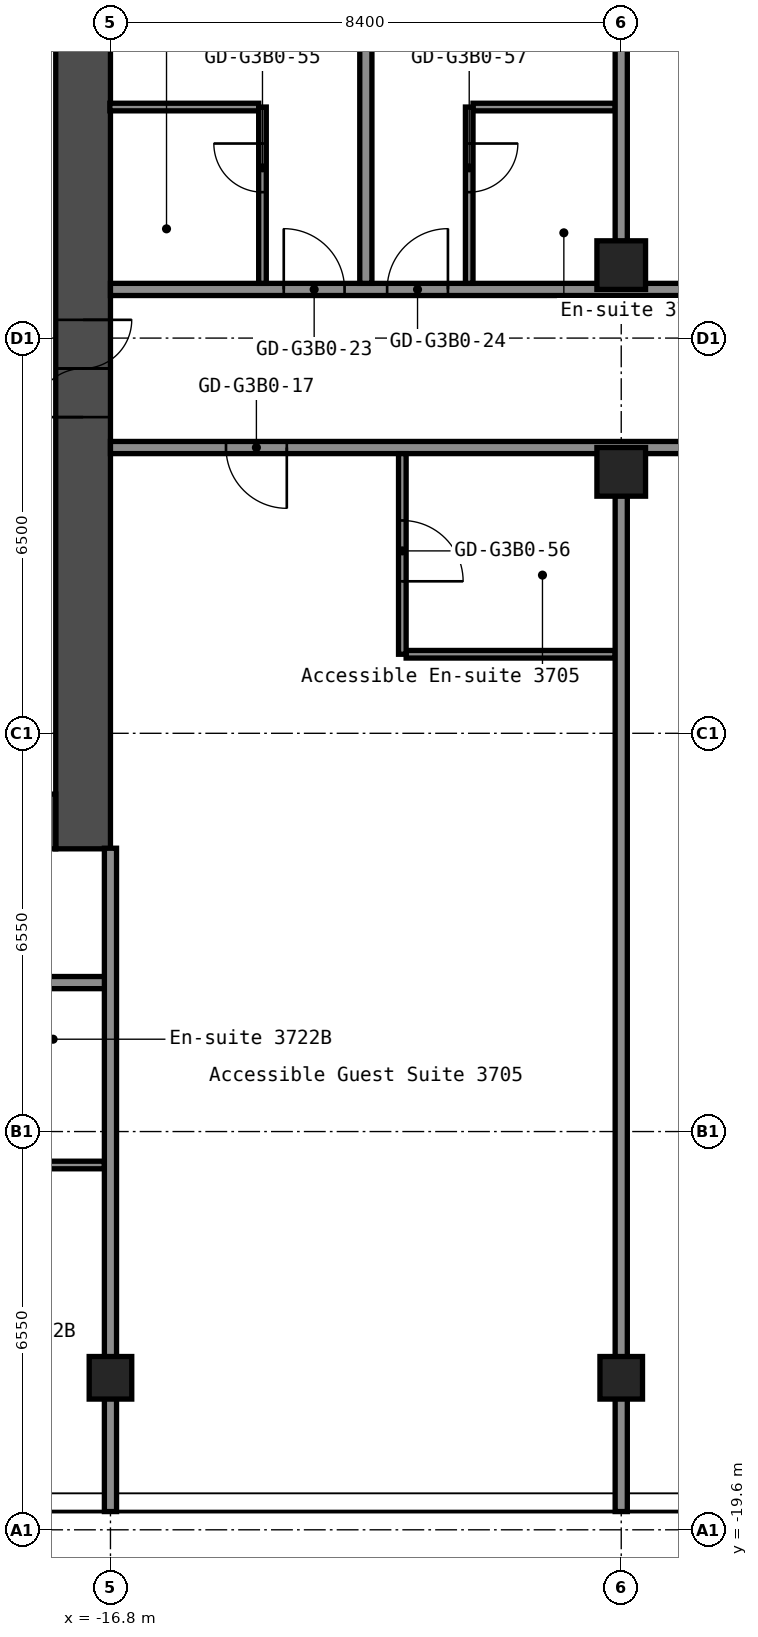
"""IFC4 building model, lengths in metres.
Left out: names, types, materials, properties, quantities, classifications, styles, units other than length and angle.
Written with IfcOpenShell. Run it as: python <this file> out.ifc"""

import sys

from ifc_helpers import new_model, si_unit, direction, frame, frame_2d, origin, origin_2d, place, context, subcontext, project, spatial, rectangle, hollow_rectangle, extrude, element, fill, save


model = new_model("IFC4")
c1 = context("Model", 3, precision=1e-05, world=origin(), true_north=direction((0.0, 1.0)))
c2 = subcontext(c1, "Body", "Model", "MODEL_VIEW")
j1 = project(units=[si_unit("LENGTHUNIT", "METRE"), si_unit("PLANEANGLEUNIT", "RADIAN")], contexts=[c1])
p1 = place(None, origin())
s1 = spatial("IfcSite", under=j1, at=p1, CompositionType="ELEMENT")
p2 = place(p1, origin())
s2 = spatial("IfcBuilding", under=s1, at=p2, CompositionType="ELEMENT")
p3 = place(p2, frame((0.0, 0.0, 134.2)))
s3 = spatial("IfcBuildingStorey", under=s2, at=p3, CompositionType="ELEMENT", Elevation=134.2)
for number, where, z_axis, x_axis in (
    (1, (-16.8, -17.1, 0.0), (0.0, 0.0, 1.0), (1.0, 0.0, 0.0)),
    (2, (-8.4, -17.1, 0.0), (0.0, 0.0, 1.0), (1.0, 0.0, 0.0)),
):
    element("IfcColumn", number, at=place(p3, frame(where, z_axis=z_axis, x_axis=x_axis)), inside=s3, PredefinedType="COLUMN", context=c2, shape_type="SweptSolid", body=[
        extrude(hollow_rectangle(XDim=0.7, YDim=0.7, WallThickness=0.028, at=origin_2d()), origin(), (0.0, 0.0, 1.0), 2.75),
    ])
for number, where, z_axis, x_axis in (
    (3, (-8.4, -2.2, 0.0), (0.0, 0.0, 1.0), (1.0, 0.0, 0.0)),
    (4, (-8.4, 1.2, 0.0), (0.0, 0.0, 1.0), (1.0, 0.0, 0.0)),
):
    element("IfcColumn", number, at=place(p3, frame(where, z_axis=z_axis, x_axis=x_axis)), inside=s3, PredefinedType="COLUMN", context=c2, shape_type="SweptSolid", body=[
        extrude(hollow_rectangle(XDim=0.8, YDim=0.8, WallThickness=0.032, at=origin_2d()), origin(), (0.0, 0.0, 1.0), 2.75),
    ])
p4 = place(p3, frame((-17.25, -8.4, 0.0), z_axis=(0.0, 0.0, 1.0), x_axis=(0.0, 1.0, 0.0)))
e5 = element("IfcWall", 5, at=p4, inside=s3, PredefinedType="SHEAR", context=c2, shape_type="SweptSolid", body=[
    extrude(rectangle(XDim=16.8, YDim=0.9, at=frame_2d((8.4, 0.0))), origin(), (0.0, 0.0, 1.0), 2.75),
])
p5 = place(p4, frame((7.1, 0.0, 0.0)))
e6 = element("IfcOpeningElement", 6, at=p5, cuts=e5, PredefinedType="OPENING", context=c2, shape_type="SweptSolid", body=[
    extrude(rectangle(XDim=1.6, YDim=2.1, at=frame_2d((0.8, 1.05))), frame((0.0, 0.46, 0.0), z_axis=(0.0, -1.0, 0.0), x_axis=(1.0, 0.0, 0.0)), (0.0, 0.0, 1.0), 0.92),
])
p6 = place(p3, frame((-32.7, -7.95, 0.0), z_axis=(0.0, 0.0, 1.0), x_axis=(1.0, 0.0, 0.0)))
e7 = element("IfcWall", 7, at=p6, inside=s3, PredefinedType="SHEAR", context=c2, shape_type="SweptSolid", body=[
    extrude(rectangle(XDim=15.0, YDim=0.9, at=frame_2d((7.5, 0.0))), origin(), (0.0, 0.0, 1.0), 2.75),
])
p7 = place(p6, frame((11.45, 0.0, 0.0)))
e8 = element("IfcOpeningElement", 8, at=p7, cuts=e7, PredefinedType="OPENING", context=c2, shape_type="SweptSolid", body=[
    extrude(rectangle(XDim=1.0, YDim=2.1, at=frame_2d((0.5, 1.05))), frame((0.0, 0.46, 0.0), z_axis=(0.0, -1.0, 0.0), x_axis=(1.0, 0.0, 0.0)), (0.0, 0.0, 1.0), 0.92),
])
p8 = place(p3, frame((-19.238, -13.6, 0.0), z_axis=(0.0, 0.0, 1.0), x_axis=(1.0, 0.0, 0.0)))
e9 = element("IfcWall", 9, at=p8, inside=s3, PredefinedType="PARTITIONING", context=c2, shape_type="SweptSolid", body=[
    extrude(rectangle(XDim=2.338, YDim=0.125, at=frame_2d((1.169, 0.0))), origin(), (0.0, 0.0, 1.0), 2.75),
])
p9 = place(p3, frame((-42.7, -10.6, 0.0), z_axis=(0.0, 0.0, 1.0), x_axis=(1.0, 0.0, 0.0)))
e10 = element("IfcWall", 10, at=p9, inside=s3, PredefinedType="PARTITIONING", context=c2, shape_type="SweptSolid", body=[
    extrude(rectangle(XDim=25.9, YDim=0.2, at=frame_2d((12.95, 0.0))), origin(), (0.0, 0.0, 1.0), 2.75),
])
p10 = place(p9, frame((3.25, 0.0, 0.0)))
e11 = element("IfcOpeningElement", 11, at=p10, cuts=e10, PredefinedType="OPENING", context=c2, shape_type="SweptSolid", body=[
    extrude(rectangle(XDim=1.0, YDim=2.1, at=frame_2d((0.5, 1.05))), frame((0.0, 0.11, 0.0), z_axis=(0.0, -1.0, 0.0), x_axis=(1.0, 0.0, 0.0)), (0.0, 0.0, 1.0), 0.22),
])
p11 = place(p9, frame((5.15, 0.0, 0.0)))
e12 = element("IfcOpeningElement", 12, at=p11, cuts=e10, PredefinedType="OPENING", context=c2, shape_type="SweptSolid", body=[
    extrude(rectangle(XDim=1.0, YDim=2.1, at=frame_2d((0.5, 1.05))), frame((0.0, 0.11, 0.0), z_axis=(0.0, -1.0, 0.0), x_axis=(1.0, 0.0, 0.0)), (0.0, 0.0, 1.0), 0.22),
])
p12 = place(p9, frame((11.95, 0.0, 0.0)))
e13 = element("IfcOpeningElement", 13, at=p12, cuts=e10, PredefinedType="OPENING", context=c2, shape_type="SweptSolid", body=[
    extrude(rectangle(XDim=1.0, YDim=2.1, at=frame_2d((0.5, 1.05))), frame((0.0, 0.11, 0.0), z_axis=(0.0, -1.0, 0.0), x_axis=(1.0, 0.0, 0.0)), (0.0, 0.0, 1.0), 0.22),
])
p13 = place(p9, frame((13.65, 0.0, 0.0)))
e14 = element("IfcOpeningElement", 14, at=p13, cuts=e10, PredefinedType="OPENING", context=c2, shape_type="SweptSolid", body=[
    extrude(rectangle(XDim=1.0, YDim=2.1, at=frame_2d((0.5, 1.05))), frame((0.0, 0.11, 0.0), z_axis=(0.0, -1.0, 0.0), x_axis=(1.0, 0.0, 0.0)), (0.0, 0.0, 1.0), 0.22),
])
p14 = place(p9, frame((20.35, 0.0, 0.0)))
e15 = element("IfcOpeningElement", 15, at=p14, cuts=e10, PredefinedType="OPENING", context=c2, shape_type="SweptSolid", body=[
    extrude(rectangle(XDim=1.0, YDim=2.1, at=frame_2d((0.5, 1.05))), frame((0.0, 0.11, 0.0), z_axis=(0.0, -1.0, 0.0), x_axis=(1.0, 0.0, 0.0)), (0.0, 0.0, 1.0), 0.22),
])
p15 = place(p9, frame((22.05, 0.0, 0.0)))
e16 = element("IfcOpeningElement", 16, at=p15, cuts=e10, PredefinedType="OPENING", context=c2, shape_type="SweptSolid", body=[
    extrude(rectangle(XDim=1.0, YDim=2.1, at=frame_2d((0.5, 1.05))), frame((0.0, 0.11, 0.0), z_axis=(0.0, -1.0, 0.0), x_axis=(1.0, 0.0, 0.0)), (0.0, 0.0, 1.0), 0.22),
])
p16 = place(p3, frame((-11.938, -5.2, 0.0), z_axis=(0.0, 0.0, 1.0), x_axis=(1.0, 0.0, 0.0)))
e17 = element("IfcWall", 17, at=p16, inside=s3, PredefinedType="PARTITIONING", context=c2, shape_type="SweptSolid", body=[
    extrude(rectangle(XDim=3.438, YDim=0.125, at=frame_2d((1.719, 0.0))), origin(), (0.0, 0.0, 1.0), 2.75),
])
p17 = place(p3, frame((-16.8, -1.8, 0.0), z_axis=(0.0, 0.0, 1.0), x_axis=(1.0, 0.0, 0.0)))
e18 = element("IfcWall", 18, at=p17, inside=s3, PredefinedType="PARTITIONING", context=c2, shape_type="SweptSolid", body=[
    extrude(rectangle(XDim=33.6, YDim=0.2, at=frame_2d((16.8, 0.0))), origin(), (0.0, 0.0, 1.0), 2.75),
])
p18 = place(p17, frame((1.9, 0.0, 0.0)))
e19 = element("IfcOpeningElement", 19, at=p18, cuts=e18, PredefinedType="OPENING", context=c2, shape_type="SweptSolid", body=[
    extrude(rectangle(XDim=1.0, YDim=2.1, at=frame_2d((0.5, 1.05))), frame((0.0, 0.11, 0.0), z_axis=(0.0, -1.0, 0.0), x_axis=(1.0, 0.0, 0.0)), (0.0, 0.0, 1.0), 0.22),
])
p19 = place(p17, frame((10.3, 0.0, 0.0)))
e20 = element("IfcOpeningElement", 20, at=p19, cuts=e18, PredefinedType="OPENING", context=c2, shape_type="SweptSolid", body=[
    extrude(rectangle(XDim=1.0, YDim=2.1, at=frame_2d((0.5, 1.05))), frame((0.0, 0.11, 0.0), z_axis=(0.0, -1.0, 0.0), x_axis=(1.0, 0.0, 0.0)), (0.0, 0.0, 1.0), 0.22),
])
p20 = place(p17, frame((19.04, 0.0, 0.0)))
e21 = element("IfcOpeningElement", 21, at=p20, cuts=e18, PredefinedType="OPENING", context=c2, shape_type="SweptSolid", body=[
    extrude(rectangle(XDim=0.9, YDim=2.1, at=frame_2d((0.45, 1.05))), frame((0.0, 0.11, 0.0), z_axis=(0.0, -1.0, 0.0), x_axis=(1.0, 0.0, 0.0)), (0.0, 0.0, 1.0), 0.22),
])
p21 = place(p17, frame((23.24, 0.0, 0.0)))
e22 = element("IfcOpeningElement", 22, at=p21, cuts=e18, PredefinedType="OPENING", context=c2, shape_type="SweptSolid", body=[
    extrude(rectangle(XDim=0.9, YDim=2.1, at=frame_2d((0.45, 1.05))), frame((0.0, 0.11, 0.0), z_axis=(0.0, -1.0, 0.0), x_axis=(1.0, 0.0, 0.0)), (0.0, 0.0, 1.0), 0.22),
])
p22 = place(p17, frame((28.05, 0.0, 0.0)))
e23 = element("IfcOpeningElement", 23, at=p22, cuts=e18, PredefinedType="OPENING", context=c2, shape_type="SweptSolid", body=[
    extrude(rectangle(XDim=1.0, YDim=2.1, at=frame_2d((0.5, 1.05))), frame((0.0, 0.11, 0.0), z_axis=(0.0, -1.0, 0.0), x_axis=(1.0, 0.0, 0.0)), (0.0, 0.0, 1.0), 0.22),
])
p23 = place(p17, frame((29.75, 0.0, 0.0)))
e24 = element("IfcOpeningElement", 24, at=p23, cuts=e18, PredefinedType="OPENING", context=c2, shape_type="SweptSolid", body=[
    extrude(rectangle(XDim=1.0, YDim=2.1, at=frame_2d((0.5, 1.05))), frame((0.0, 0.11, 0.0), z_axis=(0.0, -1.0, 0.0), x_axis=(1.0, 0.0, 0.0)), (0.0, 0.0, 1.0), 0.22),
])
p24 = place(p3, frame((-16.8, 0.8, 0.0), z_axis=(0.0, 0.0, 1.0), x_axis=(1.0, 0.0, 0.0)))
e25 = element("IfcWall", 25, at=p24, inside=s3, PredefinedType="PARTITIONING", context=c2, shape_type="SweptSolid", body=[
    extrude(rectangle(XDim=33.6, YDim=0.2, at=frame_2d((16.8, 0.0))), origin(), (0.0, 0.0, 1.0), 2.75),
])
p25 = place(p24, frame((2.85, 0.0, 0.0)))
e26 = element("IfcOpeningElement", 26, at=p25, cuts=e25, PredefinedType="OPENING", context=c2, shape_type="SweptSolid", body=[
    extrude(rectangle(XDim=1.0, YDim=2.1, at=frame_2d((0.5, 1.05))), frame((0.0, 0.11, 0.0), z_axis=(0.0, -1.0, 0.0), x_axis=(1.0, 0.0, 0.0)), (0.0, 0.0, 1.0), 0.22),
])
p26 = place(p24, frame((4.55, 0.0, 0.0)))
e27 = element("IfcOpeningElement", 27, at=p26, cuts=e25, PredefinedType="OPENING", context=c2, shape_type="SweptSolid", body=[
    extrude(rectangle(XDim=1.0, YDim=2.1, at=frame_2d((0.5, 1.05))), frame((0.0, 0.11, 0.0), z_axis=(0.0, -1.0, 0.0), x_axis=(1.0, 0.0, 0.0)), (0.0, 0.0, 1.0), 0.22),
])
p27 = place(p24, frame((12.1, 0.0, 0.0)))
e28 = element("IfcOpeningElement", 28, at=p27, cuts=e25, PredefinedType="OPENING", context=c2, shape_type="SweptSolid", body=[
    extrude(rectangle(XDim=1.0, YDim=2.1, at=frame_2d((0.5, 1.05))), frame((0.0, 0.11, 0.0), z_axis=(0.0, -1.0, 0.0), x_axis=(1.0, 0.0, 0.0)), (0.0, 0.0, 1.0), 0.22),
])
p28 = place(p24, frame((19.65, 0.0, 0.0)))
e29 = element("IfcOpeningElement", 29, at=p28, cuts=e25, PredefinedType="OPENING", context=c2, shape_type="SweptSolid", body=[
    extrude(rectangle(XDim=1.0, YDim=2.1, at=frame_2d((0.5, 1.05))), frame((0.0, 0.11, 0.0), z_axis=(0.0, -1.0, 0.0), x_axis=(1.0, 0.0, 0.0)), (0.0, 0.0, 1.0), 0.22),
])
p29 = place(p24, frame((21.35, 0.0, 0.0)))
e30 = element("IfcOpeningElement", 30, at=p29, cuts=e25, PredefinedType="OPENING", context=c2, shape_type="SweptSolid", body=[
    extrude(rectangle(XDim=1.0, YDim=2.1, at=frame_2d((0.5, 1.05))), frame((0.0, 0.11, 0.0), z_axis=(0.0, -1.0, 0.0), x_axis=(1.0, 0.0, 0.0)), (0.0, 0.0, 1.0), 0.22),
])
p30 = place(p24, frame((28.05, 0.0, 0.0)))
e31 = element("IfcOpeningElement", 31, at=p30, cuts=e25, PredefinedType="OPENING", context=c2, shape_type="SweptSolid", body=[
    extrude(rectangle(XDim=1.0, YDim=2.1, at=frame_2d((0.5, 1.05))), frame((0.0, 0.11, 0.0), z_axis=(0.0, -1.0, 0.0), x_axis=(1.0, 0.0, 0.0)), (0.0, 0.0, 1.0), 0.22),
])
p31 = place(p24, frame((29.75, 0.0, 0.0)))
e32 = element("IfcOpeningElement", 32, at=p31, cuts=e25, PredefinedType="OPENING", context=c2, shape_type="SweptSolid", body=[
    extrude(rectangle(XDim=1.0, YDim=2.1, at=frame_2d((0.5, 1.05))), frame((0.0, 0.11, 0.0), z_axis=(0.0, -1.0, 0.0), x_axis=(1.0, 0.0, 0.0)), (0.0, 0.0, 1.0), 0.22),
])
p32 = place(p3, frame((-16.81, 3.8, 0.0), z_axis=(0.0, 0.0, 1.0), x_axis=(1.0, 0.0, 0.0)))
e33 = element("IfcWall", 33, at=p32, inside=s3, PredefinedType="PARTITIONING", context=c2, shape_type="SweptSolid", body=[
    extrude(rectangle(XDim=2.448, YDim=0.125, at=frame_2d((1.224, 0.0))), origin(), (0.0, 0.0, 1.0), 2.75),
])
p33 = place(p3, frame((-10.837, 3.8, 0.0), z_axis=(0.0, 0.0, 1.0), x_axis=(1.0, 0.0, 0.0)))
e34 = element("IfcWall", 34, at=p33, inside=s3, PredefinedType="PARTITIONING", context=c2, shape_type="SweptSolid", body=[
    extrude(rectangle(XDim=2.337, YDim=0.125, at=frame_2d((1.169, 0.0))), origin(), (0.0, 0.0, 1.0), 2.75),
])
p34 = place(p3, frame((-16.8, -19.3, 0.0), z_axis=(0.0, 0.0, 1.0), x_axis=(0.0, 1.0, 0.0)))
e35 = element("IfcWall", 35, at=p34, inside=s3, PredefinedType="PARTITIONING", context=c2, shape_type="SweptSolid", body=[
    extrude(rectangle(XDim=10.91, YDim=0.2, at=frame_2d((5.455, 0.0))), origin(), (0.0, 0.0, 1.0), 2.75),
])
p35 = place(p3, frame((-14.3, 0.9, 0.0), z_axis=(0.0, 0.0, 1.0), x_axis=(0.0, 1.0, 0.0)))
e36 = element("IfcWall", 36, at=p35, inside=s3, PredefinedType="PARTITIONING", context=c2, shape_type="SweptSolid", body=[
    extrude(rectangle(XDim=2.9, YDim=0.125, at=frame_2d((1.45, 0.0))), origin(), (0.0, 0.0, 1.0), 2.75),
])
p36 = place(p35, frame((1.5, 0.0, 0.0)))
e37 = element("IfcOpeningElement", 37, at=p36, cuts=e36, PredefinedType="OPENING", context=c2, shape_type="SweptSolid", body=[
    extrude(rectangle(XDim=0.8, YDim=2.1, at=frame_2d((0.4, 1.05))), frame((0.0, 0.073, 0.0), z_axis=(0.0, -1.0, 0.0), x_axis=(1.0, 0.0, 0.0)), (0.0, 0.0, 1.0), 0.145),
])
p37 = place(p3, frame((-12.6, 0.9, 0.0), z_axis=(0.0, 0.0, 1.0), x_axis=(0.0, 1.0, 0.0)))
e38 = element("IfcWall", 38, at=p37, inside=s3, PredefinedType="PARTITIONING", context=c2, shape_type="SweptSolid", body=[
    extrude(rectangle(XDim=17.4, YDim=0.2, at=frame_2d((8.7, 0.0))), origin(), (0.0, 0.0, 1.0), 2.75),
])
p38 = place(p3, frame((-12.0, -5.2, 0.0), z_axis=(0.0, 0.0, 1.0), x_axis=(0.0, 1.0, 0.0)))
e39 = element("IfcWall", 39, at=p38, inside=s3, PredefinedType="PARTITIONING", context=c2, shape_type="SweptSolid", body=[
    extrude(rectangle(XDim=3.3, YDim=0.125, at=frame_2d((1.65, 0.0))), origin(), (0.0, 0.0, 1.0), 2.75),
])
p39 = place(p38, frame((1.2, 0.0, 0.0)))
e40 = element("IfcOpeningElement", 40, at=p39, cuts=e39, PredefinedType="OPENING", context=c2, shape_type="SweptSolid", body=[
    extrude(rectangle(XDim=1.0, YDim=2.1, at=frame_2d((0.5, 1.05))), frame((0.0, 0.073, 0.0), z_axis=(0.0, -1.0, 0.0), x_axis=(1.0, 0.0, 0.0)), (0.0, 0.0, 1.0), 0.145),
])
p40 = place(p3, frame((-10.9, 0.9, 0.0), z_axis=(0.0, 0.0, 1.0), x_axis=(0.0, 1.0, 0.0)))
e41 = element("IfcWall", 41, at=p40, inside=s3, PredefinedType="PARTITIONING", context=c2, shape_type="SweptSolid", body=[
    extrude(rectangle(XDim=2.9, YDim=0.125, at=frame_2d((1.45, 0.0))), origin(), (0.0, 0.0, 1.0), 2.75),
])
p41 = place(p40, frame((1.5, 0.0, 0.0)))
e42 = element("IfcOpeningElement", 42, at=p41, cuts=e41, PredefinedType="OPENING", context=c2, shape_type="SweptSolid", body=[
    extrude(rectangle(XDim=0.8, YDim=2.1, at=frame_2d((0.4, 1.05))), frame((0.0, 0.073, 0.0), z_axis=(0.0, -1.0, 0.0), x_axis=(1.0, 0.0, 0.0)), (0.0, 0.0, 1.0), 0.145),
])
for number, where, z_axis, x_axis in (
    (43, (-8.4, -19.3, 0.0), (0.0, 0.0, 1.0), (0.0, 1.0, 0.0)),
    (44, (-8.4, 1.59, 0.0), (0.0, 0.0, 1.0), (0.0, 1.0, 0.0)),
):
    element("IfcWall", number, at=place(p3, frame(where, z_axis=z_axis, x_axis=x_axis)), inside=s3, PredefinedType="PARTITIONING", context=c2, shape_type="SweptSolid", body=[
        extrude(rectangle(XDim=16.71, YDim=0.2, at=frame_2d((8.355, 0.0))), origin(), (0.0, 0.0, 1.0), 2.75),
    ])
p42 = place(p5, origin())
e45 = element("IfcDoor", 45, at=p42, inside=s3, OperationType="DOUBLE_DOOR_SINGLE_SWING", PredefinedType="DOOR", context=c2, shape_type="SweptSolid", body=[
    extrude(rectangle(XDim=1.6, YDim=2.1, at=frame_2d((0.8, 1.05))), frame((0.0, 0.025, 0.0), z_axis=(0.0, -1.0, 0.0), x_axis=(1.0, 0.0, 0.0)), (0.0, 0.0, 1.0), 0.05),
])
fill(e6, e45)
p43 = place(p18, origin())
e46 = element("IfcDoor", 46, at=p43, inside=s3, OperationType="SINGLE_SWING_RIGHT", PredefinedType="DOOR", context=c2, shape_type="SweptSolid", body=[
    extrude(rectangle(XDim=1.0, YDim=2.1, at=frame_2d((0.5, 1.05))), frame((0.0, 0.025, 0.0), z_axis=(0.0, -1.0, 0.0), x_axis=(1.0, 0.0, 0.0)), (0.0, 0.0, 1.0), 0.05),
])
fill(e19, e46)
p44 = place(p25, origin())
e47 = element("IfcDoor", 47, at=p44, inside=s3, OperationType="SINGLE_SWING_RIGHT", PredefinedType="DOOR", context=c2, shape_type="SweptSolid", body=[
    extrude(rectangle(XDim=1.0, YDim=2.1, at=frame_2d((0.5, 1.05))), frame((0.0, 0.025, 0.0), z_axis=(0.0, -1.0, 0.0), x_axis=(1.0, 0.0, 0.0)), (0.0, 0.0, 1.0), 0.05),
])
fill(e26, e47)
p45 = place(p26, origin())
e48 = element("IfcDoor", 48, at=p45, inside=s3, OperationType="SINGLE_SWING_LEFT", PredefinedType="DOOR", context=c2, shape_type="SweptSolid", body=[
    extrude(rectangle(XDim=1.0, YDim=2.1, at=frame_2d((0.5, 1.05))), frame((0.0, 0.025, 0.0), z_axis=(0.0, -1.0, 0.0), x_axis=(1.0, 0.0, 0.0)), (0.0, 0.0, 1.0), 0.05),
])
fill(e27, e48)
p46 = place(p36, origin())
e49 = element("IfcDoor", 49, at=p46, inside=s3, OperationType="SINGLE_SWING_LEFT", PredefinedType="DOOR", context=c2, shape_type="SweptSolid", body=[
    extrude(rectangle(XDim=0.8, YDim=2.1, at=frame_2d((0.4, 1.05))), frame((0.0, 0.025, 0.0), z_axis=(0.0, -1.0, 0.0), x_axis=(1.0, 0.0, 0.0)), (0.0, 0.0, 1.0), 0.05),
])
fill(e37, e49)
p47 = place(p39, origin())
e50 = element("IfcDoor", 50, at=p47, inside=s3, OperationType="SINGLE_SWING_LEFT", PredefinedType="DOOR", context=c2, shape_type="SweptSolid", body=[
    extrude(rectangle(XDim=1.0, YDim=2.1, at=frame_2d((0.5, 1.05))), frame((0.0, 0.025, 0.0), z_axis=(0.0, -1.0, 0.0), x_axis=(1.0, 0.0, 0.0)), (0.0, 0.0, 1.0), 0.05),
])
fill(e40, e50)
p48 = place(p41, origin())
e51 = element("IfcDoor", 51, at=p48, inside=s3, OperationType="SINGLE_SWING_RIGHT", PredefinedType="DOOR", context=c2, shape_type="SweptSolid", body=[
    extrude(rectangle(XDim=0.8, YDim=2.1, at=frame_2d((0.4, 1.05))), frame((0.0, 0.025, 0.0), z_axis=(0.0, -1.0, 0.0), x_axis=(1.0, 0.0, 0.0)), (0.0, 0.0, 1.0), 0.05),
])
fill(e42, e51)
save(model, sys.argv[1])
